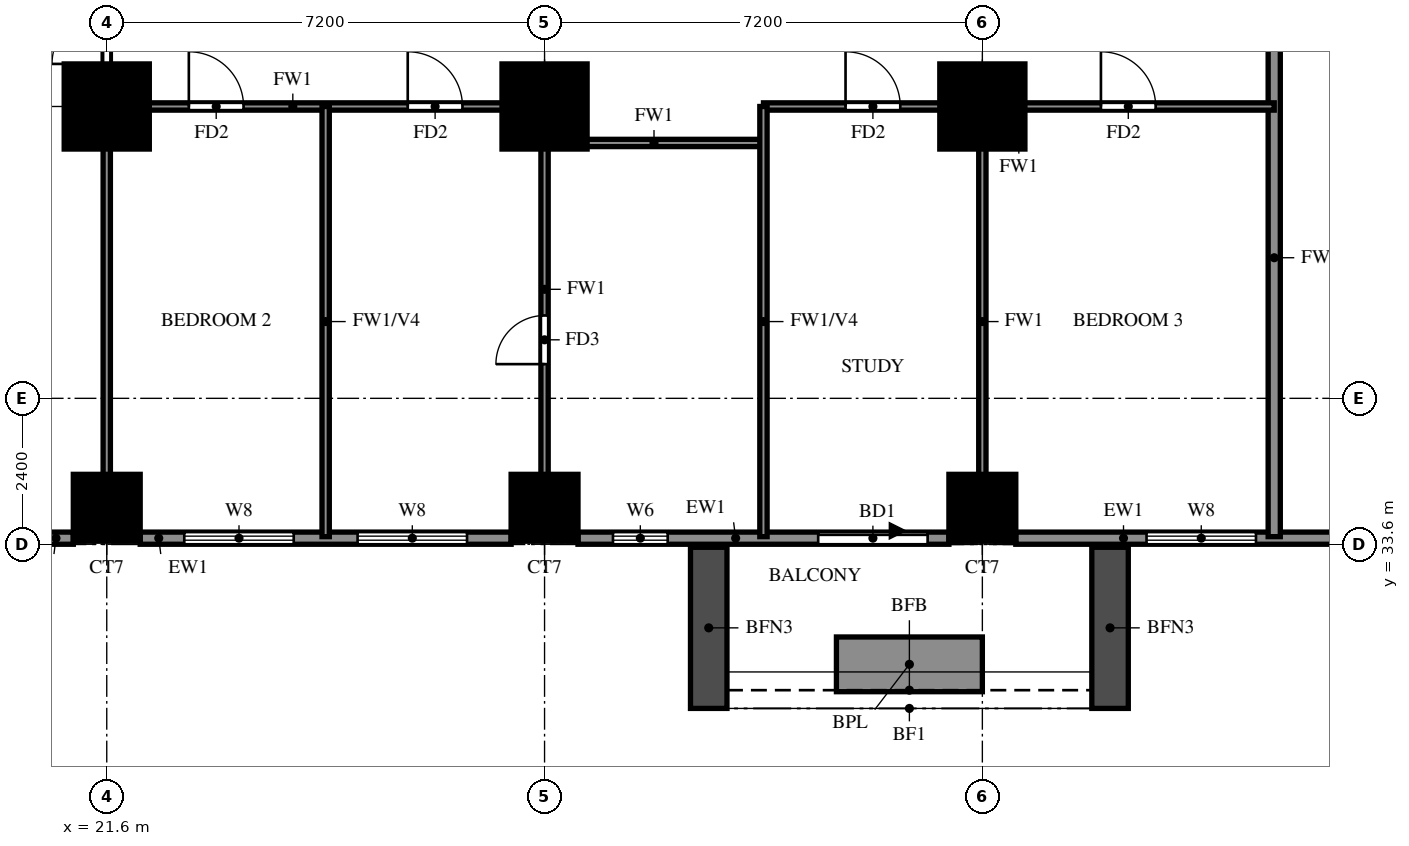
"""IFC4 building model, lengths in metres.
Left out: names, types, materials, properties, quantities, classifications, styles, units other than length and angle.
Written with IfcOpenShell. Run it as: python <this file> out.ifc"""

import sys

from ifc_helpers import new_model, si_unit, direction, frame, frame_2d, origin, origin_2d, place, context, subcontext, project, spatial, rectangle, extrude, source, transform, mapped, element, fill, save


model = new_model("IFC4")
c1 = context("Model", 3, precision=1e-05, world=origin(), true_north=direction((0.0, 1.0)))
c2 = subcontext(c1, "Body", "Model", "MODEL_VIEW")
j1 = project(units=[si_unit("LENGTHUNIT", "METRE"), si_unit("PLANEANGLEUNIT", "RADIAN")], contexts=[c1])
p1 = place(None, origin())
s1 = spatial("IfcSite", under=j1, at=p1, CompositionType="ELEMENT")
p2 = place(p1, origin())
s2 = spatial("IfcBuilding", under=s1, at=p2, CompositionType="ELEMENT")
p3 = place(p2, frame((0.0, 0.0, 37.5)))
s3 = spatial("IfcBuildingStorey", under=s2, at=p3, CompositionType="ELEMENT", Elevation=37.5)
m1 = source(origin(), c2, "Body", "SweptSolid", [
    extrude(rectangle(XDim=1.1, YDim=1.1, at=origin_2d()), origin(), (0.0, 0.0, 1.0), 3.18),
])
for number, where, z_axis, x_axis in (
    (1, (21.6, 34.2, 0.0), (0.0, 0.0, 1.0), (1.0, 0.0, 0.0)),
    (2, (28.8, 34.2, 0.0), (0.0, 0.0, 1.0), (1.0, 0.0, 0.0)),
    (3, (36.0, 34.2, 0.0), (0.0, 0.0, 1.0), (1.0, 0.0, 0.0)),
):
    element("IfcColumn", number, at=place(p3, frame(where, z_axis=z_axis, x_axis=x_axis)), inside=s3, PredefinedType="COLUMN", context=c2, shape_type="MappedRepresentation", body=[
        mapped(m1, transform((0.0, 0.0, 0.0))),
    ])
m2 = source(origin(), c2, "Body", "SweptSolid", [
    extrude(rectangle(XDim=1.4, YDim=1.4, at=origin_2d()), origin(), (0.0, 0.0, 1.0), 3.18),
])
for number, where, z_axis, x_axis in (
    (4, (21.6, 40.8, 0.0), (0.0, 0.0, 1.0), (1.0, 0.0, 0.0)),
    (5, (28.8, 40.8, 0.0), (0.0, 0.0, 1.0), (1.0, 0.0, 0.0)),
    (6, (36.0, 40.8, 0.0), (0.0, 0.0, 1.0), (1.0, 0.0, 0.0)),
):
    element("IfcColumn", number, at=place(p3, frame(where, z_axis=z_axis, x_axis=x_axis)), inside=s3, PredefinedType="COLUMN", context=c2, shape_type="MappedRepresentation", body=[
        mapped(m2, transform((0.0, 0.0, 0.0))),
    ])
p4 = place(p3, frame((18.2, 33.7, 0.0), z_axis=(0.0, 0.0, 1.0), x_axis=(1.0, 0.0, 0.0)))
e7 = element("IfcWall", 7, at=p4, inside=s3, PredefinedType="SOLIDWALL", context=c2, shape_type="SweptSolid", body=[
    extrude(rectangle(XDim=2.85, YDim=0.2, at=frame_2d((1.425, 0.0))), origin(), (0.0, 0.0, 1.0), 3.18),
])
p5 = place(p4, frame((0.525, 0.0, 0.6)))
e8 = element("IfcOpeningElement", 8, at=p5, cuts=e7, PredefinedType="OPENING", context=c2, shape_type="SweptSolid", body=[
    extrude(rectangle(XDim=1.8, YDim=2.4, at=frame_2d((0.9, 1.2))), frame((0.0, 0.11, 0.0), z_axis=(0.0, -1.0, 0.0), x_axis=(1.0, 0.0, 0.0)), (0.0, 0.0, 1.0), 0.22),
])
p6 = place(p3, frame((22.15, 33.7, 0.0), z_axis=(0.0, 0.0, 1.0), x_axis=(1.0, 0.0, 0.0)))
e9 = element("IfcWall", 9, at=p6, inside=s3, PredefinedType="SOLIDWALL", context=c2, shape_type="SweptSolid", body=[
    extrude(rectangle(XDim=6.1, YDim=0.2, at=frame_2d((3.05, 0.0))), origin(), (0.0, 0.0, 1.0), 3.18),
])
p7 = place(p6, frame((0.725, 0.0, 0.6)))
e10 = element("IfcOpeningElement", 10, at=p7, cuts=e9, PredefinedType="OPENING", context=c2, shape_type="SweptSolid", body=[
    extrude(rectangle(XDim=1.8, YDim=2.4, at=frame_2d((0.9, 1.2))), frame((0.0, 0.11, 0.0), z_axis=(0.0, -1.0, 0.0), x_axis=(1.0, 0.0, 0.0)), (0.0, 0.0, 1.0), 0.22),
])
p8 = place(p6, frame((3.575, 0.0, 0.6)))
e11 = element("IfcOpeningElement", 11, at=p8, cuts=e9, PredefinedType="OPENING", context=c2, shape_type="SweptSolid", body=[
    extrude(rectangle(XDim=1.8, YDim=2.4, at=frame_2d((0.9, 1.2))), frame((0.0, 0.11, 0.0), z_axis=(0.0, -1.0, 0.0), x_axis=(1.0, 0.0, 0.0)), (0.0, 0.0, 1.0), 0.22),
])
p9 = place(p3, frame((29.35, 33.7, 0.0), z_axis=(0.0, 0.0, 1.0), x_axis=(1.0, 0.0, 0.0)))
e12 = element("IfcWall", 12, at=p9, inside=s3, PredefinedType="SOLIDWALL", context=c2, shape_type="SweptSolid", body=[
    extrude(rectangle(XDim=6.1, YDim=0.2, at=frame_2d((3.05, 0.0))), origin(), (0.0, 0.0, 1.0), 3.18),
])
p10 = place(p9, frame((3.95, 0.0, 0.0)))
e13 = element("IfcOpeningElement", 13, at=p10, cuts=e12, PredefinedType="OPENING", context=c2, shape_type="SweptSolid", body=[
    extrude(rectangle(XDim=1.8, YDim=2.4, at=frame_2d((0.9, 1.2))), frame((0.0, 0.11, 0.0), z_axis=(0.0, -1.0, 0.0), x_axis=(1.0, 0.0, 0.0)), (0.0, 0.0, 1.0), 0.22),
])
p11 = place(p9, frame((0.575, 0.0, 1.5)))
e14 = element("IfcOpeningElement", 14, at=p11, cuts=e12, PredefinedType="OPENING", context=c2, shape_type="SweptSolid", body=[
    extrude(rectangle(XDim=0.9, YDim=0.9, at=frame_2d((0.45, 0.45))), frame((0.0, 0.11, 0.0), z_axis=(0.0, -1.0, 0.0), x_axis=(1.0, 0.0, 0.0)), (0.0, 0.0, 1.0), 0.22),
])
p12 = place(p3, frame((36.55, 33.7, 0.0), z_axis=(0.0, 0.0, 1.0), x_axis=(1.0, 0.0, 0.0)))
e15 = element("IfcWall", 15, at=p12, inside=s3, PredefinedType="SOLIDWALL", context=c2, shape_type="SweptSolid", body=[
    extrude(rectangle(XDim=5.45, YDim=0.2, at=frame_2d((2.725, 0.0))), origin(), (0.0, 0.0, 1.0), 3.18),
])
p13 = place(p12, frame((2.15, 0.0, 0.6)))
e16 = element("IfcOpeningElement", 16, at=p13, cuts=e15, PredefinedType="OPENING", context=c2, shape_type="SweptSolid", body=[
    extrude(rectangle(XDim=1.8, YDim=2.4, at=frame_2d((0.9, 1.2))), frame((0.0, 0.11, 0.0), z_axis=(0.0, -1.0, 0.0), x_axis=(1.0, 0.0, 0.0)), (0.0, 0.0, 1.0), 0.22),
])
for number, where, z_axis, x_axis in (
    (17, (31.5, 33.55, 0.0), (0.0, 0.0, 1.0), (0.0, -1.0, 0.0)),
    (18, (38.1, 33.55, 0.0), (0.0, 0.0, 1.0), (0.0, -1.0, 0.0)),
):
    element("IfcWall", number, at=place(p3, frame(where, z_axis=z_axis, x_axis=x_axis)), inside=s3, PredefinedType="SOLIDWALL", context=c2, shape_type="SweptSolid", body=[
        extrude(rectangle(XDim=2.65, YDim=0.6, at=frame_2d((1.325, 0.0))), origin(), (0.0, 0.0, 1.0), 2.85),
    ])
p14 = place(p3, frame((33.6, 31.625, 0.0), z_axis=(0.0, 0.0, 1.0), x_axis=(1.0, 0.0, 0.0)))
e19 = element("IfcWall", 19, at=p14, inside=s3, PredefinedType="SOLIDWALL", context=c2, shape_type="SweptSolid", body=[
    extrude(rectangle(XDim=2.4, YDim=0.9, at=frame_2d((1.2, 0.0))), origin(), (0.0, 0.0, 1.0), 0.9),
])
p15 = place(p3, frame((40.8, 33.725, 0.0), z_axis=(0.0, 0.0, 1.0), x_axis=(0.0, 1.0, 0.0)))
e20 = element("IfcWall", 20, at=p15, inside=s3, PredefinedType="SOLIDWALL", context=c2, shape_type="SweptSolid", body=[
    extrude(rectangle(XDim=9.175, YDim=0.2, at=frame_2d((4.587, 0.0))), origin(), (0.0, 0.0, 1.0), 2.28),
])
p16 = place(p3, frame((28.8, 40.2, 0.0), z_axis=(0.0, 0.0, 1.0), x_axis=(1.0, 0.0, 0.0)))
e21 = element("IfcWall", 21, at=p16, inside=s3, PredefinedType="PARTITIONING", context=c2, shape_type="SweptSolid", body=[
    extrude(rectangle(XDim=3.6, YDim=0.12, at=frame_2d((1.8, 0.0))), origin(), (0.0, 0.0, 1.0), 3.18),
])
p17 = place(p3, frame((21.6, 40.8, 0.0), z_axis=(0.0, 0.0, 1.0), x_axis=(1.0, 0.0, 0.0)))
e22 = element("IfcWall", 22, at=p17, inside=s3, PredefinedType="PARTITIONING", context=c2, shape_type="SweptSolid", body=[
    extrude(rectangle(XDim=7.2, YDim=0.12, at=frame_2d((3.6, 0.0))), origin(), (0.0, 0.0, 1.0), 3.18),
])
p18 = place(p17, frame((1.35, 0.0, 0.0)))
e23 = element("IfcOpeningElement", 23, at=p18, cuts=e22, PredefinedType="OPENING", context=c2, shape_type="SweptSolid", body=[
    extrude(rectangle(XDim=0.9, YDim=2.1, at=frame_2d((0.45, 1.05))), frame((0.0, 0.07, 0.0), z_axis=(0.0, -1.0, 0.0), x_axis=(1.0, 0.0, 0.0)), (0.0, 0.0, 1.0), 0.14),
])
p19 = place(p17, frame((4.95, 0.0, 0.0)))
e24 = element("IfcOpeningElement", 24, at=p19, cuts=e22, PredefinedType="OPENING", context=c2, shape_type="SweptSolid", body=[
    extrude(rectangle(XDim=0.9, YDim=2.1, at=frame_2d((0.45, 1.05))), frame((0.0, 0.07, 0.0), z_axis=(0.0, -1.0, 0.0), x_axis=(1.0, 0.0, 0.0)), (0.0, 0.0, 1.0), 0.14),
])
p20 = place(p3, frame((32.4, 40.8, 0.0), z_axis=(0.0, 0.0, 1.0), x_axis=(1.0, 0.0, 0.0)))
e25 = element("IfcWall", 25, at=p20, inside=s3, PredefinedType="PARTITIONING", context=c2, shape_type="SweptSolid", body=[
    extrude(rectangle(XDim=8.4, YDim=0.12, at=frame_2d((4.2, 0.0))), origin(), (0.0, 0.0, 1.0), 3.18),
])
p21 = place(p20, frame((1.35, 0.0, 0.0)))
e26 = element("IfcOpeningElement", 26, at=p21, cuts=e25, PredefinedType="OPENING", context=c2, shape_type="SweptSolid", body=[
    extrude(rectangle(XDim=0.9, YDim=2.1, at=frame_2d((0.45, 1.05))), frame((0.0, 0.07, 0.0), z_axis=(0.0, -1.0, 0.0), x_axis=(1.0, 0.0, 0.0)), (0.0, 0.0, 1.0), 0.14),
])
p22 = place(p20, frame((5.55, 0.0, 0.0)))
e27 = element("IfcOpeningElement", 27, at=p22, cuts=e25, PredefinedType="OPENING", context=c2, shape_type="SweptSolid", body=[
    extrude(rectangle(XDim=0.9, YDim=2.1, at=frame_2d((0.45, 1.05))), frame((0.0, 0.07, 0.0), z_axis=(0.0, -1.0, 0.0), x_axis=(1.0, 0.0, 0.0)), (0.0, 0.0, 1.0), 0.14),
])
p23 = place(p3, frame((21.6, 33.725, 0.0), z_axis=(0.0, 0.0, 1.0), x_axis=(0.0, 1.0, 0.0)))
e28 = element("IfcWall", 28, at=p23, inside=s3, PredefinedType="PARTITIONING", context=c2, shape_type="SweptSolid", body=[
    extrude(rectangle(XDim=35.875, YDim=0.12, at=frame_2d((17.938, 0.0))), origin(), (0.0, 0.0, 1.0), 3.18),
])
p24 = place(p23, frame((7.775, 0.0, 0.0)))
e29 = element("IfcOpeningElement", 29, at=p24, cuts=e28, PredefinedType="OPENING", context=c2, shape_type="SweptSolid", body=[
    extrude(rectangle(XDim=0.9, YDim=2.1, at=frame_2d((0.45, 1.05))), frame((0.0, 0.07, 0.0), z_axis=(0.0, -1.0, 0.0), x_axis=(1.0, 0.0, 0.0)), (0.0, 0.0, 1.0), 0.14),
])
p25 = place(p23, frame((15.625, 0.0, 0.0)))
e30 = element("IfcOpeningElement", 30, at=p25, cuts=e28, PredefinedType="OPENING", context=c2, shape_type="SweptSolid", body=[
    extrude(rectangle(XDim=0.9, YDim=2.1, at=frame_2d((0.45, 1.05))), frame((0.0, 0.07, 0.0), z_axis=(0.0, -1.0, 0.0), x_axis=(1.0, 0.0, 0.0)), (0.0, 0.0, 1.0), 0.14),
])
p26 = place(p23, frame((22.225, 0.0, 0.0)))
e31 = element("IfcOpeningElement", 31, at=p26, cuts=e28, PredefinedType="OPENING", context=c2, shape_type="SweptSolid", body=[
    extrude(rectangle(XDim=1.5, YDim=2.1, at=frame_2d((0.75, 1.05))), frame((0.0, 0.07, 0.0), z_axis=(0.0, -1.0, 0.0), x_axis=(1.0, 0.0, 0.0)), (0.0, 0.0, 1.0), 0.14),
])
p27 = place(p23, frame((26.425, 0.0, 0.0)))
e32 = element("IfcOpeningElement", 32, at=p27, cuts=e28, PredefinedType="OPENING", context=c2, shape_type="SweptSolid", body=[
    extrude(rectangle(XDim=0.9, YDim=2.1, at=frame_2d((0.45, 1.05))), frame((0.0, 0.07, 0.0), z_axis=(0.0, -1.0, 0.0), x_axis=(1.0, 0.0, 0.0)), (0.0, 0.0, 1.0), 0.14),
])
p28 = place(p23, frame((30.025, 0.0, 0.0)))
e33 = element("IfcOpeningElement", 33, at=p28, cuts=e28, PredefinedType="OPENING", context=c2, shape_type="SweptSolid", body=[
    extrude(rectangle(XDim=0.9, YDim=2.1, at=frame_2d((0.45, 1.05))), frame((0.0, 0.07, 0.0), z_axis=(0.0, -1.0, 0.0), x_axis=(1.0, 0.0, 0.0)), (0.0, 0.0, 1.0), 0.14),
])
p29 = place(p23, frame((33.625, 0.0, 0.0)))
e34 = element("IfcOpeningElement", 34, at=p29, cuts=e28, PredefinedType="OPENING", context=c2, shape_type="SweptSolid", body=[
    extrude(rectangle(XDim=0.9, YDim=2.1, at=frame_2d((0.45, 1.05))), frame((0.0, 0.07, 0.0), z_axis=(0.0, -1.0, 0.0), x_axis=(1.0, 0.0, 0.0)), (0.0, 0.0, 1.0), 0.14),
])
p30 = place(p3, frame((25.2, 33.725, 0.0), z_axis=(0.0, 0.0, 1.0), x_axis=(0.0, 1.0, 0.0)))
e35 = element("IfcWall", 35, at=p30, inside=s3, PredefinedType="PARTITIONING", context=c2, shape_type="SweptSolid", body=[
    extrude(rectangle(XDim=7.075, YDim=0.12, at=frame_2d((3.538, 0.0))), origin(), (0.0, 0.0, 1.0), 2.28),
])
p31 = place(p3, frame((28.8, 33.725, 0.0), z_axis=(0.0, 0.0, 1.0), x_axis=(0.0, 1.0, 0.0)))
e36 = element("IfcWall", 36, at=p31, inside=s3, PredefinedType="PARTITIONING", context=c2, shape_type="SweptSolid", body=[
    extrude(rectangle(XDim=7.075, YDim=0.12, at=frame_2d((3.538, 0.0))), origin(), (0.0, 0.0, 1.0), 3.18),
])
p32 = place(p31, frame((2.837, 0.0, 0.0)))
e37 = element("IfcOpeningElement", 37, at=p32, cuts=e36, PredefinedType="OPENING", context=c2, shape_type="SweptSolid", body=[
    extrude(rectangle(XDim=0.8, YDim=2.1, at=frame_2d((0.4, 1.05))), frame((0.0, 0.07, 0.0), z_axis=(0.0, -1.0, 0.0), x_axis=(1.0, 0.0, 0.0)), (0.0, 0.0, 1.0), 0.14),
])
p33 = place(p3, frame((32.4, 33.725, 0.0), z_axis=(0.0, 0.0, 1.0), x_axis=(0.0, 1.0, 0.0)))
e38 = element("IfcWall", 38, at=p33, inside=s3, PredefinedType="PARTITIONING", context=c2, shape_type="SweptSolid", body=[
    extrude(rectangle(XDim=7.075, YDim=0.12, at=frame_2d((3.538, 0.0))), origin(), (0.0, 0.0, 1.0), 2.28),
])
p34 = place(p3, frame((36.0, 33.725, 0.0), z_axis=(0.0, 0.0, 1.0), x_axis=(0.0, 1.0, 0.0)))
e39 = element("IfcWall", 39, at=p34, inside=s3, PredefinedType="PARTITIONING", context=c2, shape_type="SweptSolid", body=[
    extrude(rectangle(XDim=7.075, YDim=0.12, at=frame_2d((3.538, 0.0))), origin(), (0.0, 0.0, 1.0), 3.18),
])
p35 = place(p7, origin())
e40 = element("IfcWindow", 40, at=p35, inside=s3, PartitioningType="DOUBLE_PANEL_VERTICAL", PredefinedType="WINDOW", context=c2, shape_type="SweptSolid", body=[
    extrude(rectangle(XDim=1.8, YDim=2.4, at=frame_2d((0.9, 1.2))), frame((0.0, 0.03, 0.0), z_axis=(0.0, -1.0, 0.0), x_axis=(1.0, 0.0, 0.0)), (0.0, 0.0, 1.0), 0.06),
])
fill(e10, e40)
p36 = place(p8, origin())
e41 = element("IfcWindow", 41, at=p36, inside=s3, PartitioningType="DOUBLE_PANEL_VERTICAL", PredefinedType="WINDOW", context=c2, shape_type="SweptSolid", body=[
    extrude(rectangle(XDim=1.8, YDim=2.4, at=frame_2d((0.9, 1.2))), frame((0.0, 0.03, 0.0), z_axis=(0.0, -1.0, 0.0), x_axis=(1.0, 0.0, 0.0)), (0.0, 0.0, 1.0), 0.06),
])
fill(e11, e41)
p37 = place(p10, origin())
e42 = element("IfcDoor", 42, at=p37, inside=s3, OperationType="DOUBLE_DOOR_SLIDING", PredefinedType="DOOR", context=c2, shape_type="SweptSolid", body=[
    extrude(rectangle(XDim=1.8, YDim=2.4, at=frame_2d((0.9, 1.2))), frame((0.0, 0.025, 0.0), z_axis=(0.0, -1.0, 0.0), x_axis=(1.0, 0.0, 0.0)), (0.0, 0.0, 1.0), 0.05),
])
fill(e13, e42)
p38 = place(p11, origin())
e43 = element("IfcWindow", 43, at=p38, inside=s3, PartitioningType="SINGLE_PANEL", PredefinedType="WINDOW", context=c2, shape_type="SweptSolid", body=[
    extrude(rectangle(XDim=0.9, YDim=0.9, at=frame_2d((0.45, 0.45))), frame((0.0, 0.03, 0.0), z_axis=(0.0, -1.0, 0.0), x_axis=(1.0, 0.0, 0.0)), (0.0, 0.0, 1.0), 0.06),
])
fill(e14, e43)
p39 = place(p13, origin())
e44 = element("IfcWindow", 44, at=p39, inside=s3, PartitioningType="DOUBLE_PANEL_VERTICAL", PredefinedType="WINDOW", context=c2, shape_type="SweptSolid", body=[
    extrude(rectangle(XDim=1.8, YDim=2.4, at=frame_2d((0.9, 1.2))), frame((0.0, 0.03, 0.0), z_axis=(0.0, -1.0, 0.0), x_axis=(1.0, 0.0, 0.0)), (0.0, 0.0, 1.0), 0.06),
])
fill(e16, e44)
p40 = place(p24, origin())
e45 = element("IfcDoor", 45, at=p40, inside=s3, OperationType="SINGLE_SWING_LEFT", PredefinedType="DOOR", context=c2, shape_type="SweptSolid", body=[
    extrude(rectangle(XDim=0.9, YDim=2.1, at=frame_2d((0.45, 1.05))), frame((0.0, 0.025, 0.0), z_axis=(0.0, -1.0, 0.0), x_axis=(1.0, 0.0, 0.0)), (0.0, 0.0, 1.0), 0.05),
])
fill(e29, e45)
p41 = place(p18, origin())
e46 = element("IfcDoor", 46, at=p41, inside=s3, OperationType="SINGLE_SWING_LEFT", PredefinedType="DOOR", context=c2, shape_type="SweptSolid", body=[
    extrude(rectangle(XDim=0.9, YDim=2.1, at=frame_2d((0.45, 1.05))), frame((0.0, 0.025, 0.0), z_axis=(0.0, -1.0, 0.0), x_axis=(1.0, 0.0, 0.0)), (0.0, 0.0, 1.0), 0.05),
])
fill(e23, e46)
p42 = place(p19, origin())
e47 = element("IfcDoor", 47, at=p42, inside=s3, OperationType="SINGLE_SWING_LEFT", PredefinedType="DOOR", context=c2, shape_type="SweptSolid", body=[
    extrude(rectangle(XDim=0.9, YDim=2.1, at=frame_2d((0.45, 1.05))), frame((0.0, 0.025, 0.0), z_axis=(0.0, -1.0, 0.0), x_axis=(1.0, 0.0, 0.0)), (0.0, 0.0, 1.0), 0.05),
])
fill(e24, e47)
p43 = place(p32, origin())
e48 = element("IfcDoor", 48, at=p43, inside=s3, OperationType="SINGLE_SWING_RIGHT", PredefinedType="DOOR", context=c2, shape_type="SweptSolid", body=[
    extrude(rectangle(XDim=0.8, YDim=2.1, at=frame_2d((0.4, 1.05))), frame((0.0, 0.025, 0.0), z_axis=(0.0, -1.0, 0.0), x_axis=(1.0, 0.0, 0.0)), (0.0, 0.0, 1.0), 0.05),
])
fill(e37, e48)
p44 = place(p21, origin())
e49 = element("IfcDoor", 49, at=p44, inside=s3, OperationType="SINGLE_SWING_LEFT", PredefinedType="DOOR", context=c2, shape_type="SweptSolid", body=[
    extrude(rectangle(XDim=0.9, YDim=2.1, at=frame_2d((0.45, 1.05))), frame((0.0, 0.025, 0.0), z_axis=(0.0, -1.0, 0.0), x_axis=(1.0, 0.0, 0.0)), (0.0, 0.0, 1.0), 0.05),
])
fill(e26, e49)
p45 = place(p22, origin())
e50 = element("IfcDoor", 50, at=p45, inside=s3, OperationType="SINGLE_SWING_LEFT", PredefinedType="DOOR", context=c2, shape_type="SweptSolid", body=[
    extrude(rectangle(XDim=0.9, YDim=2.1, at=frame_2d((0.45, 1.05))), frame((0.0, 0.025, 0.0), z_axis=(0.0, -1.0, 0.0), x_axis=(1.0, 0.0, 0.0)), (0.0, 0.0, 1.0), 0.05),
])
fill(e27, e50)
save(model, sys.argv[1])
